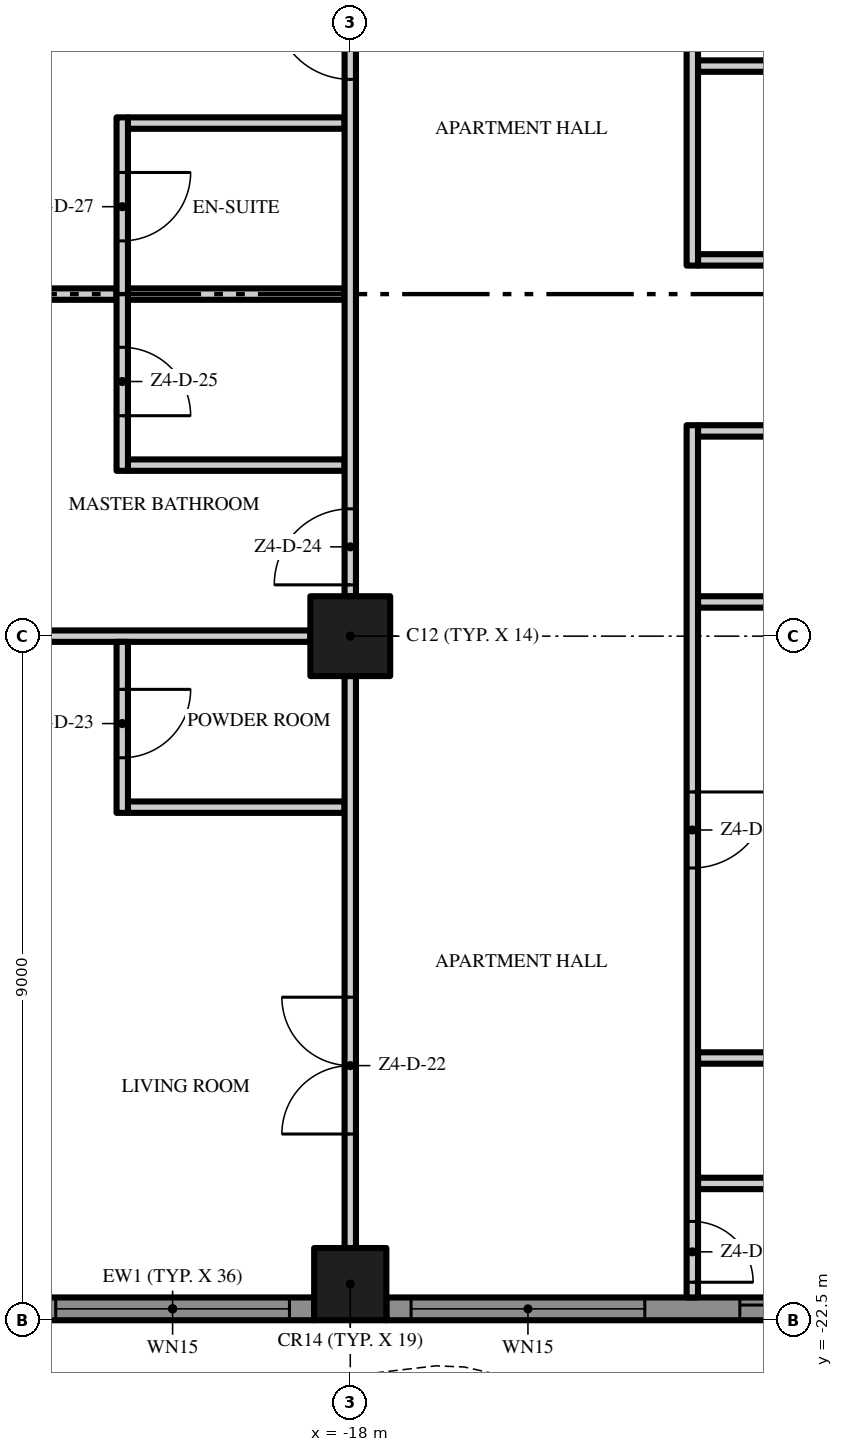
"""IFC4 building model, lengths in metres.
Left out: names, types, materials, properties, quantities, classifications, styles, units other than length and angle.
Written with IfcOpenShell. Run it as: python <this file> out.ifc"""

import sys

from ifc_helpers import new_model, si_unit, direction, frame, frame_2d, origin, origin_2d, place, context, subcontext, project, spatial, polyline, rectangle, outline, extrude, element, fill, save


model = new_model("IFC4")
c1 = context("Model", 3, precision=1e-05, world=origin(), true_north=direction((0.0, 1.0)))
c2 = subcontext(c1, "Body", "Model", "MODEL_VIEW")
j1 = project(units=[si_unit("LENGTHUNIT", "METRE"), si_unit("PLANEANGLEUNIT", "RADIAN")], contexts=[c1])
p1 = place(None, origin())
s1 = spatial("IfcSite", under=j1, at=p1, CompositionType="ELEMENT")
p2 = place(p1, origin())
s2 = spatial("IfcBuilding", under=s1, at=p2, CompositionType="ELEMENT")
p3 = place(p2, frame((0.0, 0.0, 222.4)))
s3 = spatial("IfcBuildingStorey", under=s2, at=p3, CompositionType="ELEMENT", Elevation=222.4)
p4 = place(p3, frame((-18.0, -13.5, 0.0), z_axis=(0.0, 0.0, 1.0), x_axis=(1.0, 0.0, 0.0)))
e1 = element("IfcColumn", 1, at=p4, inside=s3, PredefinedType="COLUMN", context=c2, shape_type="SweptSolid", body=[
    extrude(rectangle(XDim=1.05, YDim=1.05, at=origin_2d()), origin(), (0.0, 0.0, 1.0), 3.5),
])
p5 = place(p3, frame((-18.0, -22.025, 0.0), z_axis=(0.0, 0.0, 1.0), x_axis=(1.0, 0.0, 0.0)))
e2 = element("IfcColumn", 2, at=p5, inside=s3, PredefinedType="COLUMN", context=c2, shape_type="SweptSolid", body=[
    extrude(rectangle(XDim=0.95, YDim=0.95, at=origin_2d()), origin(), (0.0, 0.0, 1.0), 3.5),
])
p6 = place(p3, frame((-18.475, -22.35, 0.0), z_axis=(0.0, 0.0, 1.0), x_axis=(-1.0, 0.0, 0.0)))
e3 = element("IfcWall", 3, at=p6, inside=s3, PredefinedType="SOLIDWALL", context=c2, shape_type="SweptSolid", body=[
    extrude(rectangle(XDim=3.725, YDim=0.3, at=frame_2d((1.863, 0.0))), origin(), (0.0, 0.0, 1.0), 3.5),
])
p7 = place(p6, frame((0.325, 0.0, 0.45)))
e4 = element("IfcOpeningElement", 4, at=p7, cuts=e3, PredefinedType="OPENING", context=c2, shape_type="SweptSolid", body=[
    extrude(rectangle(XDim=3.075, YDim=2.65, at=frame_2d((1.538, 1.325))), frame((0.0, 0.16, 0.0), z_axis=(0.0, -1.0, 0.0), x_axis=(1.0, 0.0, 0.0)), (0.0, 0.0, 1.0), 0.32),
])
p8 = place(p3, frame((-9.475, -22.35, 0.0), z_axis=(0.0, 0.0, 1.0), x_axis=(-1.0, 0.0, 0.0)))
e5 = element("IfcWall", 5, at=p8, inside=s3, PredefinedType="SOLIDWALL", context=c2, shape_type="SweptSolid", body=[
    extrude(rectangle(XDim=8.05, YDim=0.3, at=frame_2d((4.025, 0.0))), origin(), (0.0, 0.0, 1.0), 3.5),
])
p9 = place(p8, frame((4.65, 0.0, 0.45)))
e6 = element("IfcOpeningElement", 6, at=p9, cuts=e5, PredefinedType="OPENING", context=c2, shape_type="SweptSolid", body=[
    extrude(rectangle(XDim=3.075, YDim=2.65, at=frame_2d((1.538, 1.325))), frame((0.0, 0.16, 0.0), z_axis=(0.0, -1.0, 0.0), x_axis=(1.0, 0.0, 0.0)), (0.0, 0.0, 1.0), 0.32),
])
p10 = place(p8, frame((0.325, 0.0, 0.0)))
e7 = element("IfcOpeningElement", 7, at=p10, cuts=e5, PredefinedType="OPENING", context=c2, shape_type="SweptSolid", body=[
    extrude(rectangle(XDim=3.075, YDim=2.4, at=frame_2d((1.538, 1.2))), frame((0.0, 0.16, 0.0), z_axis=(0.0, -1.0, 0.0), x_axis=(1.0, 0.0, 0.0)), (0.0, 0.0, 1.0), 0.32),
])
p11 = place(p3, origin())
e8 = element("IfcWall", 8, at=p11, inside=s3, PredefinedType="USERDEFINED", context=c2, shape_type="SweptSolid", body=[
    extrude(outline(polyline([(-22.5, -25.149), (-21.0, -24.488), (-19.5, -23.755), (-18.0, -23.231), (-16.875, -23.1), (-16.5, -23.115), (-15.0, -23.451), (-13.5, -24.112), (-12.0, -24.845), (-10.5, -25.369), (-9.375, -25.5), (-9.0, -25.485), (-7.5, -25.149), (-6.0, -24.488), (-4.5, -23.755), (-3.0, -23.231), (-1.875, -23.1), (-1.5, -23.115), (0.0, -23.451), (1.5, -24.112), (3.0, -24.845), (4.5, -25.369), (5.625, -25.5), (6.0, -25.485), (7.5, -25.149), (9.0, -24.488), (10.5, -23.755), (12.0, -23.231), (13.125, -23.1), (13.5, -23.115), (15.0, -23.451), (16.5, -24.112), (18.0, -24.845), (19.5, -25.369), (20.625, -25.5), (21.0, -25.485), (22.5, -25.149), (22.445, -24.905), (20.967, -25.236), (20.635, -25.249), (19.556, -25.124), (18.096, -24.614), (16.605, -23.885), (15.079, -23.213), (13.533, -22.866), (13.115, -22.849), (11.944, -22.986), (10.404, -23.524), (8.895, -24.261), (7.421, -24.91), (5.967, -25.236), (5.635, -25.249), (4.556, -25.124), (3.096, -24.614), (1.605, -23.885), (0.079, -23.213), (-1.467, -22.866), (-1.885, -22.849), (-3.056, -22.986), (-4.596, -23.524), (-6.105, -24.261), (-7.579, -24.91), (-9.033, -25.236), (-9.365, -25.249), (-10.444, -25.124), (-11.904, -24.614), (-13.395, -23.885), (-14.921, -23.213), (-16.467, -22.866), (-16.885, -22.849), (-18.056, -22.986), (-19.596, -23.524), (-21.105, -24.261), (-22.601, -24.92), (-22.5, -25.149)])), origin(), (0.0, 0.0, 1.0), 0.9),
])
for number, where, z_axis, x_axis in (
    (9, (-13.425, -20.7, 0.0), (0.0, 0.0, 1.0), (1.0, 0.0, 0.0)),
    (10, (-13.425, -19.05, 0.0), (0.0, 0.0, 1.0), (1.0, 0.0, 0.0)),
):
    element("IfcWall", number, at=place(p3, frame(where, z_axis=z_axis, x_axis=x_axis)), inside=s3, PredefinedType="PARTITIONING", context=c2, shape_type="SweptSolid", body=[
        extrude(rectangle(XDim=4.35, YDim=0.15, at=frame_2d((2.175, 0.0))), origin(), (0.0, 0.0, 1.0), 3.5),
    ])
p12 = place(p3, frame((-20.925, -15.75, 0.0), z_axis=(0.0, 0.0, 1.0), x_axis=(1.0, 0.0, 0.0)))
e11 = element("IfcWall", 11, at=p12, inside=s3, PredefinedType="PARTITIONING", context=c2, shape_type="SweptSolid", body=[
    extrude(rectangle(XDim=2.85, YDim=0.15, at=frame_2d((1.425, 0.0))), origin(), (0.0, 0.0, 1.0), 3.5),
])
p13 = place(p3, frame((-26.05, -13.5, 0.0), z_axis=(0.0, 0.0, 1.0), x_axis=(1.0, 0.0, 0.0)))
e12 = element("IfcWall", 12, at=p13, inside=s3, PredefinedType="PARTITIONING", context=c2, shape_type="SweptSolid", body=[
    extrude(rectangle(XDim=7.525, YDim=0.15, at=frame_2d((3.763, 0.0))), origin(), (0.0, 0.0, 1.0), 3.5),
])
p14 = place(p3, frame((-13.425, -13.05, 0.0), z_axis=(0.0, 0.0, 1.0), x_axis=(1.0, 0.0, 0.0)))
e13 = element("IfcWall", 13, at=p14, inside=s3, PredefinedType="PARTITIONING", context=c2, shape_type="SweptSolid", body=[
    extrude(rectangle(XDim=3.9, YDim=0.15, at=frame_2d((1.95, 0.0))), origin(), (0.0, 0.0, 1.0), 3.5),
])
p15 = place(p3, frame((-20.925, -11.25, 0.0), z_axis=(0.0, 0.0, 1.0), x_axis=(1.0, 0.0, 0.0)))
e14 = element("IfcWall", 14, at=p15, inside=s3, PredefinedType="PARTITIONING", context=c2, shape_type="SweptSolid", body=[
    extrude(rectangle(XDim=2.85, YDim=0.15, at=frame_2d((1.425, 0.0))), origin(), (0.0, 0.0, 1.0), 3.5),
])
p16 = place(p3, frame((-9.075, -10.8, 0.0), z_axis=(0.0, 0.0, 1.0), x_axis=(-1.0, 0.0, 0.0)))
e15 = element("IfcWall", 15, at=p16, inside=s3, PredefinedType="PARTITIONING", context=c2, shape_type="SweptSolid", body=[
    extrude(rectangle(XDim=4.35, YDim=0.15, at=frame_2d((2.175, 0.0))), origin(), (0.0, 0.0, 1.0), 3.5),
])
p17 = place(p16, frame((1.7, 0.0, 0.0)))
e16 = element("IfcOpeningElement", 16, at=p17, cuts=e15, PredefinedType="OPENING", context=c2, shape_type="SweptSolid", body=[
    extrude(rectangle(XDim=0.9, YDim=2.1, at=frame_2d((0.45, 1.05))), frame((0.0, 0.085, 0.0), z_axis=(0.0, -1.0, 0.0), x_axis=(1.0, 0.0, 0.0)), (0.0, 0.0, 1.0), 0.17),
])
p18 = place(p3, frame((-26.7, -9.0, 0.0), z_axis=(0.0, 0.0, 1.0), x_axis=(1.0, 0.0, 0.0)))
e17 = element("IfcWall", 17, at=p18, inside=s3, PredefinedType="PARTITIONING", context=c2, shape_type="SweptSolid", body=[
    extrude(rectangle(XDim=5.625, YDim=0.15, at=frame_2d((2.812, 0.0))), origin(), (0.0, 0.0, 1.0), 3.5),
])
p19 = place(p3, frame((-20.925, -9.0, 0.0), z_axis=(0.0, 0.0, 1.0), x_axis=(1.0, 0.0, 0.0)))
e18 = element("IfcWall", 18, at=p19, inside=s3, PredefinedType="PARTITIONING", context=c2, shape_type="SweptSolid", body=[
    extrude(rectangle(XDim=2.85, YDim=0.15, at=frame_2d((1.425, 0.0))), origin(), (0.0, 0.0, 1.0), 3.5),
])
p20 = place(p3, frame((-13.425, -8.55, 0.0), z_axis=(0.0, 0.0, 1.0), x_axis=(1.0, 0.0, 0.0)))
e19 = element("IfcWall", 19, at=p20, inside=s3, PredefinedType="PARTITIONING", context=c2, shape_type="SweptSolid", body=[
    extrude(rectangle(XDim=4.35, YDim=0.15, at=frame_2d((2.175, 0.0))), origin(), (0.0, 0.0, 1.0), 3.5),
])
p21 = place(p3, frame((-20.925, -6.75, 0.0), z_axis=(0.0, 0.0, 1.0), x_axis=(1.0, 0.0, 0.0)))
e20 = element("IfcWall", 20, at=p21, inside=s3, PredefinedType="PARTITIONING", context=c2, shape_type="SweptSolid", body=[
    extrude(rectangle(XDim=2.85, YDim=0.15, at=frame_2d((1.425, 0.0))), origin(), (0.0, 0.0, 1.0), 3.5),
])
p22 = place(p3, frame((-13.425, -6.0, 0.0), z_axis=(0.0, 0.0, 1.0), x_axis=(1.0, 0.0, 0.0)))
e21 = element("IfcWall", 21, at=p22, inside=s3, PredefinedType="PARTITIONING", context=c2, shape_type="SweptSolid", body=[
    extrude(rectangle(XDim=4.35, YDim=0.15, at=frame_2d((2.175, 0.0))), origin(), (0.0, 0.0, 1.0), 3.5),
])
p23 = place(p3, frame((-21.0, -13.575, 0.0), z_axis=(0.0, 0.0, 1.0), x_axis=(0.0, -1.0, 0.0)))
e22 = element("IfcWall", 22, at=p23, inside=s3, PredefinedType="PARTITIONING", context=c2, shape_type="SweptSolid", body=[
    extrude(rectangle(XDim=2.25, YDim=0.15, at=frame_2d((1.125, 0.0))), origin(), (0.0, 0.0, 1.0), 3.5),
])
p24 = place(p23, frame((0.625, 0.0, 0.0)))
e23 = element("IfcOpeningElement", 23, at=p24, cuts=e22, PredefinedType="OPENING", context=c2, shape_type="SweptSolid", body=[
    extrude(rectangle(XDim=0.9, YDim=2.1, at=frame_2d((0.45, 1.05))), frame((0.0, 0.085, 0.0), z_axis=(0.0, -1.0, 0.0), x_axis=(1.0, 0.0, 0.0)), (0.0, 0.0, 1.0), 0.17),
])
p25 = place(p3, frame((-21.0, -6.675, 0.0), z_axis=(0.0, 0.0, 1.0), x_axis=(0.0, -1.0, 0.0)))
e24 = element("IfcWall", 24, at=p25, inside=s3, PredefinedType="PARTITIONING", context=c2, shape_type="SweptSolid", body=[
    extrude(rectangle(XDim=4.65, YDim=0.15, at=frame_2d((2.325, 0.0))), origin(), (0.0, 0.0, 1.0), 3.5),
])
p26 = place(p25, frame((3.025, 0.0, 0.0)))
e25 = element("IfcOpeningElement", 25, at=p26, cuts=e24, PredefinedType="OPENING", context=c2, shape_type="SweptSolid", body=[
    extrude(rectangle(XDim=0.9, YDim=2.1, at=frame_2d((0.45, 1.05))), frame((0.0, 0.085, 0.0), z_axis=(0.0, -1.0, 0.0), x_axis=(1.0, 0.0, 0.0)), (0.0, 0.0, 1.0), 0.17),
])
p27 = place(p25, frame((0.725, 0.0, 0.0)))
e26 = element("IfcOpeningElement", 26, at=p27, cuts=e24, PredefinedType="OPENING", context=c2, shape_type="SweptSolid", body=[
    extrude(rectangle(XDim=0.9, YDim=2.1, at=frame_2d((0.45, 1.05))), frame((0.0, 0.085, 0.0), z_axis=(0.0, -1.0, 0.0), x_axis=(1.0, 0.0, 0.0)), (0.0, 0.0, 1.0), 0.17),
])
p28 = place(p3, frame((-18.0, -21.55, 0.0), z_axis=(0.0, 0.0, 1.0), x_axis=(0.0, 1.0, 0.0)))
e27 = element("IfcWall", 27, at=p28, inside=s3, PredefinedType="PARTITIONING", context=c2, shape_type="SweptSolid", body=[
    extrude(rectangle(XDim=7.525, YDim=0.15, at=frame_2d((3.763, 0.0))), origin(), (0.0, 0.0, 1.0), 3.5),
])
p29 = place(p28, frame((1.5, 0.0, 0.0)))
e28 = element("IfcOpeningElement", 28, at=p29, cuts=e27, PredefinedType="OPENING", context=c2, shape_type="SweptSolid", body=[
    extrude(rectangle(XDim=1.8, YDim=2.4, at=frame_2d((0.9, 1.2))), frame((0.0, 0.085, 0.0), z_axis=(0.0, -1.0, 0.0), x_axis=(1.0, 0.0, 0.0)), (0.0, 0.0, 1.0), 0.17),
])
p30 = place(p3, frame((-18.0, -12.975, 0.0), z_axis=(0.0, 0.0, 1.0), x_axis=(0.0, 1.0, 0.0)))
e29 = element("IfcWall", 29, at=p30, inside=s3, PredefinedType="PARTITIONING", context=c2, shape_type="SweptSolid", body=[
    extrude(rectangle(XDim=7.95, YDim=0.15, at=frame_2d((3.975, 0.0))), origin(), (0.0, 0.0, 1.0), 3.5),
])
p31 = place(p30, frame((0.15, 0.0, 0.0)))
e30 = element("IfcOpeningElement", 30, at=p31, cuts=e29, PredefinedType="OPENING", context=c2, shape_type="SweptSolid", body=[
    extrude(rectangle(XDim=1.0, YDim=2.4, at=frame_2d((0.5, 1.2))), frame((0.0, 0.085, 0.0), z_axis=(0.0, -1.0, 0.0), x_axis=(1.0, 0.0, 0.0)), (0.0, 0.0, 1.0), 0.17),
])
p32 = place(p30, frame((6.8, 0.0, 0.0)))
e31 = element("IfcOpeningElement", 31, at=p32, cuts=e29, PredefinedType="OPENING", context=c2, shape_type="SweptSolid", body=[
    extrude(rectangle(XDim=1.0, YDim=2.4, at=frame_2d((0.5, 1.2))), frame((0.0, 0.085, 0.0), z_axis=(0.0, -1.0, 0.0), x_axis=(1.0, 0.0, 0.0)), (0.0, 0.0, 1.0), 0.17),
])
p33 = place(p3, frame((-13.5, -10.725, 0.0), z_axis=(0.0, 0.0, 1.0), x_axis=(0.0, -1.0, 0.0)))
e32 = element("IfcWall", 32, at=p33, inside=s3, PredefinedType="PARTITIONING", context=c2, shape_type="SweptSolid", body=[
    extrude(rectangle(XDim=11.475, YDim=0.15, at=frame_2d((5.737, 0.0))), origin(), (0.0, 0.0, 1.0), 3.5),
])
p34 = place(p33, frame((10.475, 0.0, 0.0)))
e33 = element("IfcOpeningElement", 33, at=p34, cuts=e32, PredefinedType="OPENING", context=c2, shape_type="SweptSolid", body=[
    extrude(rectangle(XDim=0.8, YDim=2.0, at=frame_2d((0.4, 1.0))), frame((0.0, 0.085, 0.0), z_axis=(0.0, -1.0, 0.0), x_axis=(1.0, 0.0, 0.0)), (0.0, 0.0, 1.0), 0.17),
])
p35 = place(p33, frame((4.825, 0.0, 0.0)))
e34 = element("IfcOpeningElement", 34, at=p35, cuts=e32, PredefinedType="OPENING", context=c2, shape_type="SweptSolid", body=[
    extrude(rectangle(XDim=1.0, YDim=2.4, at=frame_2d((0.5, 1.2))), frame((0.0, 0.085, 0.0), z_axis=(0.0, -1.0, 0.0), x_axis=(1.0, 0.0, 0.0)), (0.0, 0.0, 1.0), 0.17),
])
p36 = place(p3, frame((-13.5, -0.1, 0.0), z_axis=(0.0, 0.0, 1.0), x_axis=(0.0, -1.0, 0.0)))
e35 = element("IfcWall", 35, at=p36, inside=s3, PredefinedType="PARTITIONING", context=c2, shape_type="SweptSolid", body=[
    extrude(rectangle(XDim=8.525, YDim=0.15, at=frame_2d((4.263, 0.0))), origin(), (0.0, 0.0, 1.0), 3.5),
])
p37 = place(p36, frame((4.0, 0.0, 0.0)))
e36 = element("IfcOpeningElement", 36, at=p37, cuts=e35, PredefinedType="OPENING", context=c2, shape_type="SweptSolid", body=[
    extrude(rectangle(XDim=0.8, YDim=2.0, at=frame_2d((0.4, 1.0))), frame((0.0, 0.085, 0.0), z_axis=(0.0, -1.0, 0.0), x_axis=(1.0, 0.0, 0.0)), (0.0, 0.0, 1.0), 0.17),
])
p38 = place(p7, origin())
e37 = element("IfcWindow", 37, at=p38, inside=s3, PartitioningType="SINGLE_PANEL", PredefinedType="WINDOW", context=c2, shape_type="SweptSolid", body=[
    extrude(rectangle(XDim=3.075, YDim=2.65, at=frame_2d((1.538, 1.325))), frame((0.0, 0.03, 0.0), z_axis=(0.0, -1.0, 0.0), x_axis=(1.0, 0.0, 0.0)), (0.0, 0.0, 1.0), 0.06),
])
fill(e4, e37)
p39 = place(p9, origin())
e38 = element("IfcWindow", 38, at=p39, inside=s3, PartitioningType="SINGLE_PANEL", PredefinedType="WINDOW", context=c2, shape_type="SweptSolid", body=[
    extrude(rectangle(XDim=3.075, YDim=2.65, at=frame_2d((1.538, 1.325))), frame((0.0, 0.03, 0.0), z_axis=(0.0, -1.0, 0.0), x_axis=(1.0, 0.0, 0.0)), (0.0, 0.0, 1.0), 0.06),
])
fill(e6, e38)
p40 = place(p10, origin())
e39 = element("IfcDoor", 39, at=p40, inside=s3, OperationType="SINGLE_SWING_LEFT", PredefinedType="DOOR", context=c2, shape_type="SweptSolid", body=[
    extrude(rectangle(XDim=3.075, YDim=2.4, at=frame_2d((1.538, 1.2))), frame((0.0, 0.025, 0.0), z_axis=(0.0, -1.0, 0.0), x_axis=(1.0, 0.0, 0.0)), (0.0, 0.0, 1.0), 0.05),
])
fill(e7, e39)
p41 = place(p34, origin())
e40 = element("IfcDoor", 40, at=p41, inside=s3, OperationType="SINGLE_SWING_RIGHT", PredefinedType="DOOR", context=c2, shape_type="SweptSolid", body=[
    extrude(rectangle(XDim=0.8, YDim=2.0, at=frame_2d((0.4, 1.0))), frame((0.0, 0.025, 0.0), z_axis=(0.0, -1.0, 0.0), x_axis=(1.0, 0.0, 0.0)), (0.0, 0.0, 1.0), 0.05),
])
fill(e33, e40)
p42 = place(p35, origin())
e41 = element("IfcDoor", 41, at=p42, inside=s3, OperationType="SINGLE_SWING_LEFT", PredefinedType="DOOR", context=c2, shape_type="SweptSolid", body=[
    extrude(rectangle(XDim=1.0, YDim=2.4, at=frame_2d((0.5, 1.2))), frame((0.0, 0.025, 0.0), z_axis=(0.0, -1.0, 0.0), x_axis=(1.0, 0.0, 0.0)), (0.0, 0.0, 1.0), 0.05),
])
fill(e34, e41)
p43 = place(p29, origin())
e42 = element("IfcDoor", 42, at=p43, inside=s3, OperationType="DOUBLE_DOOR_SINGLE_SWING", PredefinedType="DOOR", context=c2, shape_type="SweptSolid", body=[
    extrude(rectangle(XDim=1.8, YDim=2.4, at=frame_2d((0.9, 1.2))), frame((0.0, 0.025, 0.0), z_axis=(0.0, -1.0, 0.0), x_axis=(1.0, 0.0, 0.0)), (0.0, 0.0, 1.0), 0.05),
])
fill(e28, e42)
p44 = place(p24, origin())
e43 = element("IfcDoor", 43, at=p44, inside=s3, OperationType="SINGLE_SWING_LEFT", PredefinedType="DOOR", context=c2, shape_type="SweptSolid", body=[
    extrude(rectangle(XDim=0.9, YDim=2.1, at=frame_2d((0.45, 1.05))), frame((0.0, 0.025, 0.0), z_axis=(0.0, -1.0, 0.0), x_axis=(1.0, 0.0, 0.0)), (0.0, 0.0, 1.0), 0.05),
])
fill(e23, e43)
p45 = place(p31, origin())
e44 = element("IfcDoor", 44, at=p45, inside=s3, OperationType="SINGLE_SWING_LEFT", PredefinedType="DOOR", context=c2, shape_type="SweptSolid", body=[
    extrude(rectangle(XDim=1.0, YDim=2.4, at=frame_2d((0.5, 1.2))), frame((0.0, 0.025, 0.0), z_axis=(0.0, -1.0, 0.0), x_axis=(1.0, 0.0, 0.0)), (0.0, 0.0, 1.0), 0.05),
])
fill(e30, e44)
p46 = place(p26, origin())
e45 = element("IfcDoor", 45, at=p46, inside=s3, OperationType="SINGLE_SWING_RIGHT", PredefinedType="DOOR", context=c2, shape_type="SweptSolid", body=[
    extrude(rectangle(XDim=0.9, YDim=2.1, at=frame_2d((0.45, 1.05))), frame((0.0, 0.025, 0.0), z_axis=(0.0, -1.0, 0.0), x_axis=(1.0, 0.0, 0.0)), (0.0, 0.0, 1.0), 0.05),
])
fill(e25, e45)
p47 = place(p32, origin())
e46 = element("IfcDoor", 46, at=p47, inside=s3, OperationType="SINGLE_SWING_RIGHT", PredefinedType="DOOR", context=c2, shape_type="SweptSolid", body=[
    extrude(rectangle(XDim=1.0, YDim=2.4, at=frame_2d((0.5, 1.2))), frame((0.0, 0.025, 0.0), z_axis=(0.0, -1.0, 0.0), x_axis=(1.0, 0.0, 0.0)), (0.0, 0.0, 1.0), 0.05),
])
fill(e31, e46)
p48 = place(p27, origin())
e47 = element("IfcDoor", 47, at=p48, inside=s3, OperationType="SINGLE_SWING_LEFT", PredefinedType="DOOR", context=c2, shape_type="SweptSolid", body=[
    extrude(rectangle(XDim=0.9, YDim=2.1, at=frame_2d((0.45, 1.05))), frame((0.0, 0.025, 0.0), z_axis=(0.0, -1.0, 0.0), x_axis=(1.0, 0.0, 0.0)), (0.0, 0.0, 1.0), 0.05),
])
fill(e26, e47)
save(model, sys.argv[1])
